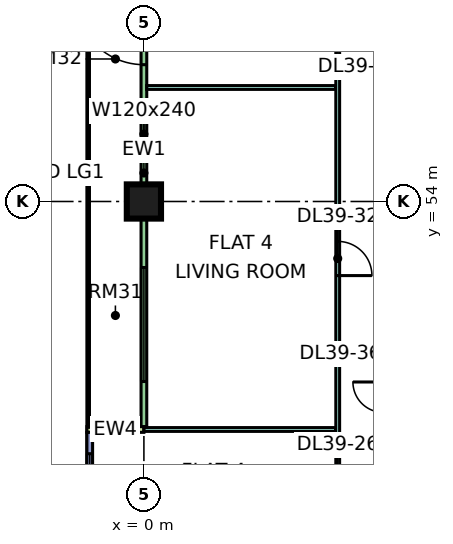
"""IFC4 building model, lengths in metres.
Left out: names, types, materials, properties, quantities, classifications, styles, units other than length and angle.
Written with IfcOpenShell. Run it as: python <this file> out.ifc"""

import sys

from ifc_helpers import new_model, si_unit, direction, frame, frame_2d, origin, origin_2d, place, context, subcontext, project, spatial, rectangle, extrude, element, fill, save


model = new_model("IFC4")
c1 = context("Model", 3, precision=1e-05, world=origin(), true_north=direction((0.0, 1.0)))
c2 = subcontext(c1, "Body", "Model", "MODEL_VIEW")
j1 = project(units=[si_unit("LENGTHUNIT", "METRE"), si_unit("PLANEANGLEUNIT", "RADIAN")], contexts=[c1])
p1 = place(None, origin())
s1 = spatial("IfcSite", under=j1, at=p1, CompositionType="ELEMENT")
p2 = place(p1, origin())
s2 = spatial("IfcBuilding", under=s1, at=p2, CompositionType="ELEMENT")
p3 = place(p2, frame((0.0, 0.0, 172.4)))
s3 = spatial("IfcBuildingStorey", under=s2, at=p3, CompositionType="ELEMENT", Elevation=172.4)
p4 = place(p3, frame((0.0, 54.0, 0.0), z_axis=(0.0, 0.0, 1.0), x_axis=(1.0, 0.0, 0.0)))
e1 = element("IfcColumn", 1, at=p4, inside=s3, PredefinedType="COLUMN", context=c2, shape_type="SweptSolid", body=[
    extrude(rectangle(XDim=0.9, YDim=0.9, at=origin_2d()), origin(), (0.0, 0.0, 1.0), 3.75),
])
p5 = place(p3, frame((0.0, 61.425, 0.0), z_axis=(0.0, 0.0, 1.0), x_axis=(0.0, -1.0, 0.0)))
e2 = element("IfcWall", 2, at=p5, inside=s3, PredefinedType="SOLIDWALL", context=c2, shape_type="SweptSolid", body=[
    extrude(rectangle(XDim=13.35, YDim=0.15, at=frame_2d((6.675, 0.0))), origin(), (0.0, 0.0, 1.0), 3.35),
])
p6 = place(p5, frame((0.262, 0.0, 0.45)))
e3 = element("IfcOpeningElement", 3, at=p6, cuts=e2, PredefinedType="OPENING", context=c2, shape_type="SweptSolid", body=[
    extrude(rectangle(XDim=0.9, YDim=2.4, at=frame_2d((0.45, 1.2))), frame((0.0, 0.085, 0.0), z_axis=(0.0, -1.0, 0.0), x_axis=(1.0, 0.0, 0.0)), (0.0, 0.0, 1.0), 0.17),
])
p7 = place(p5, frame((2.025, 0.0, 0.0)))
e4 = element("IfcOpeningElement", 4, at=p7, cuts=e2, PredefinedType="OPENING", context=c2, shape_type="SweptSolid", body=[
    extrude(rectangle(XDim=1.8, YDim=2.4, at=frame_2d((0.9, 1.2))), frame((0.0, 0.085, 0.0), z_axis=(0.0, -1.0, 0.0), x_axis=(1.0, 0.0, 0.0)), (0.0, 0.0, 1.0), 0.17),
])
p8 = place(p5, frame((5.05, 0.0, 0.45)))
e5 = element("IfcOpeningElement", 5, at=p8, cuts=e2, PredefinedType="OPENING", context=c2, shape_type="SweptSolid", body=[
    extrude(rectangle(XDim=1.2, YDim=2.4, at=frame_2d((0.6, 1.2))), frame((0.0, 0.085, 0.0), z_axis=(0.0, -1.0, 0.0), x_axis=(1.0, 0.0, 0.0)), (0.0, 0.0, 1.0), 0.17),
])
p9 = place(p5, frame((9.163, 0.0, 0.45)))
e6 = element("IfcOpeningElement", 6, at=p9, cuts=e2, PredefinedType="OPENING", context=c2, shape_type="SweptSolid", body=[
    extrude(rectangle(XDim=3.0, YDim=2.4, at=frame_2d((1.5, 1.2))), frame((0.0, 0.085, 0.0), z_axis=(0.0, -1.0, 0.0), x_axis=(1.0, 0.0, 0.0)), (0.0, 0.0, 1.0), 0.17),
])
p10 = place(p3, frame((-1.5, 48.0, 0.0), z_axis=(0.0, 0.0, 1.0), x_axis=(1.0, 0.0, 0.0)))
e7 = element("IfcWall", 7, at=p10, inside=s3, PredefinedType="SOLIDWALL", context=c2, shape_type="SweptSolid", body=[
    extrude(rectangle(XDim=1.5, YDim=0.15, at=frame_2d((0.75, 0.0))), origin(), (0.0, 0.0, 1.0), 3.35),
])
p11 = place(p3, frame((-1.425, 47.925, 0.0), z_axis=(0.0, 0.0, 1.0), x_axis=(0.0, -1.0, 0.0)))
e8 = element("IfcWall", 8, at=p11, inside=s3, PredefinedType="SOLIDWALL", context=c2, shape_type="SweptSolid", body=[
    extrude(rectangle(XDim=11.85, YDim=0.15, at=frame_2d((5.925, 0.0))), origin(), (0.0, 0.0, 1.0), 3.35),
])
p12 = place(p11, frame((0.562, 0.0, 0.45)))
e9 = element("IfcOpeningElement", 9, at=p12, cuts=e8, PredefinedType="OPENING", context=c2, shape_type="SweptSolid", body=[
    extrude(rectangle(XDim=1.8, YDim=2.4, at=frame_2d((0.9, 1.2))), frame((0.0, 0.085, 0.0), z_axis=(0.0, -1.0, 0.0), x_axis=(1.0, 0.0, 0.0)), (0.0, 0.0, 1.0), 0.17),
])
p13 = place(p11, frame((3.525, 0.0, 0.45)))
e10 = element("IfcOpeningElement", 10, at=p13, cuts=e8, PredefinedType="OPENING", context=c2, shape_type="SweptSolid", body=[
    extrude(rectangle(XDim=1.8, YDim=2.4, at=frame_2d((0.9, 1.2))), frame((0.0, 0.085, 0.0), z_axis=(0.0, -1.0, 0.0), x_axis=(1.0, 0.0, 0.0)), (0.0, 0.0, 1.0), 0.17),
])
p14 = place(p11, frame((6.525, 0.0, 0.45)))
e11 = element("IfcOpeningElement", 11, at=p14, cuts=e8, PredefinedType="OPENING", context=c2, shape_type="SweptSolid", body=[
    extrude(rectangle(XDim=1.8, YDim=2.4, at=frame_2d((0.9, 1.2))), frame((0.0, 0.085, 0.0), z_axis=(0.0, -1.0, 0.0), x_axis=(1.0, 0.0, 0.0)), (0.0, 0.0, 1.0), 0.17),
])
p15 = place(p11, frame((9.488, 0.0, 0.45)))
e12 = element("IfcOpeningElement", 12, at=p15, cuts=e8, PredefinedType="OPENING", context=c2, shape_type="SweptSolid", body=[
    extrude(rectangle(XDim=1.8, YDim=2.4, at=frame_2d((0.9, 1.2))), frame((0.0, 0.085, 0.0), z_axis=(0.0, -1.0, 0.0), x_axis=(1.0, 0.0, 0.0)), (0.0, 0.0, 1.0), 0.17),
])
p16 = place(p3, frame((0.0, 48.0, 0.0), z_axis=(0.0, 0.0, 1.0), x_axis=(1.0, 0.0, 0.0)))
e13 = element("IfcWall", 13, at=p16, inside=s3, PredefinedType="PARTITIONING", context=c2, shape_type="SweptSolid", body=[
    extrude(rectangle(XDim=5.05, YDim=0.1, at=frame_2d((2.525, 0.0))), origin(), (0.0, 0.0, 1.0), 3.35),
])
p17 = place(p3, frame((0.074, 57.0, 0.0), z_axis=(0.0, 0.0, 1.0), x_axis=(1.0, 0.0, 0.0)))
e14 = element("IfcWall", 14, at=p17, inside=s3, PredefinedType="PARTITIONING", context=c2, shape_type="SweptSolid", body=[
    extrude(rectangle(XDim=4.976, YDim=0.1, at=frame_2d((2.488, 0.0))), origin(), (0.0, 0.0, 1.0), 3.35),
])
p18 = place(p3, frame((5.1, 36.1, 0.0), z_axis=(0.0, 0.0, 1.0), x_axis=(0.0, 1.0, 0.0)))
e15 = element("IfcWall", 15, at=p18, inside=s3, PredefinedType="PARTITIONING", context=c2, shape_type="SweptSolid", body=[
    extrude(rectangle(XDim=26.826, YDim=0.1, at=frame_2d((13.413, 0.0))), origin(), (0.0, 0.0, 1.0), 3.35),
])
p19 = place(p18, frame((0.95, 0.0, 0.0)))
e16 = element("IfcOpeningElement", 16, at=p19, cuts=e15, PredefinedType="OPENING", context=c2, shape_type="SweptSolid", body=[
    extrude(rectangle(XDim=0.9, YDim=2.1, at=frame_2d((0.45, 1.05))), frame((0.0, 0.06, 0.0), z_axis=(0.0, -1.0, 0.0), x_axis=(1.0, 0.0, 0.0)), (0.0, 0.0, 1.0), 0.12),
])
p20 = place(p18, frame((3.95, 0.0, 0.0)))
e17 = element("IfcOpeningElement", 17, at=p20, cuts=e15, PredefinedType="OPENING", context=c2, shape_type="SweptSolid", body=[
    extrude(rectangle(XDim=0.9, YDim=2.1, at=frame_2d((0.45, 1.05))), frame((0.0, 0.06, 0.0), z_axis=(0.0, -1.0, 0.0), x_axis=(1.0, 0.0, 0.0)), (0.0, 0.0, 1.0), 0.12),
])
p21 = place(p18, frame((9.95, 0.0, 0.0)))
e18 = element("IfcOpeningElement", 18, at=p21, cuts=e15, PredefinedType="OPENING", context=c2, shape_type="SweptSolid", body=[
    extrude(rectangle(XDim=0.9, YDim=2.1, at=frame_2d((0.45, 1.05))), frame((0.0, 0.06, 0.0), z_axis=(0.0, -1.0, 0.0), x_axis=(1.0, 0.0, 0.0)), (0.0, 0.0, 1.0), 0.12),
])
p22 = place(p18, frame((21.95, 0.0, 0.0)))
e19 = element("IfcOpeningElement", 19, at=p22, cuts=e15, PredefinedType="OPENING", context=c2, shape_type="SweptSolid", body=[
    extrude(rectangle(XDim=0.9, YDim=2.1, at=frame_2d((0.45, 1.05))), frame((0.0, 0.06, 0.0), z_axis=(0.0, -1.0, 0.0), x_axis=(1.0, 0.0, 0.0)), (0.0, 0.0, 1.0), 0.12),
])
p23 = place(p18, frame((24.95, 0.0, 0.0)))
e20 = element("IfcOpeningElement", 20, at=p23, cuts=e15, PredefinedType="OPENING", context=c2, shape_type="SweptSolid", body=[
    extrude(rectangle(XDim=0.9, YDim=2.1, at=frame_2d((0.45, 1.05))), frame((0.0, 0.06, 0.0), z_axis=(0.0, -1.0, 0.0), x_axis=(1.0, 0.0, 0.0)), (0.0, 0.0, 1.0), 0.12),
])
p24 = place(p18, frame((15.95, 0.0, 0.0)))
e21 = element("IfcOpeningElement", 21, at=p24, cuts=e15, PredefinedType="OPENING", context=c2, shape_type="SweptSolid", body=[
    extrude(rectangle(XDim=0.9, YDim=2.1, at=frame_2d((0.45, 1.05))), frame((0.0, 0.06, 0.0), z_axis=(0.0, -1.0, 0.0), x_axis=(1.0, 0.0, 0.0)), (0.0, 0.0, 1.0), 0.12),
])
p25 = place(p18, frame((6.95, 0.0, 0.0)))
e22 = element("IfcOpeningElement", 22, at=p25, cuts=e15, PredefinedType="OPENING", context=c2, shape_type="SweptSolid", body=[
    extrude(rectangle(XDim=0.9, YDim=2.1, at=frame_2d((0.45, 1.05))), frame((0.0, 0.06, 0.0), z_axis=(0.0, -1.0, 0.0), x_axis=(1.0, 0.0, 0.0)), (0.0, 0.0, 1.0), 0.12),
])
p26 = place(p7, frame((1.8, 0.0, 0.0), z_axis=(0.0, 0.0, 1.0), x_axis=(-1.0, 0.0, 0.0)))
e23 = element("IfcDoor", 23, at=p26, inside=s3, OperationType="DOUBLE_DOOR_SINGLE_SWING", PredefinedType="DOOR", context=c2, shape_type="SweptSolid", body=[
    extrude(rectangle(XDim=1.8, YDim=2.4, at=frame_2d((0.9, 1.2))), frame((0.0, 0.025, 0.0), z_axis=(0.0, -1.0, 0.0), x_axis=(1.0, 0.0, 0.0)), (0.0, 0.0, 1.0), 0.05),
])
fill(e4, e23)
p27 = place(p8, origin())
e24 = element("IfcWindow", 24, at=p27, inside=s3, PartitioningType="SINGLE_PANEL", PredefinedType="WINDOW", context=c2, shape_type="SweptSolid", body=[
    extrude(rectangle(XDim=1.2, YDim=2.4, at=frame_2d((0.6, 1.2))), frame((0.0, 0.03, 0.0), z_axis=(0.0, -1.0, 0.0), x_axis=(1.0, 0.0, 0.0)), (0.0, 0.0, 1.0), 0.06),
])
fill(e5, e24)
p28 = place(p9, origin())
e25 = element("IfcWindow", 25, at=p28, inside=s3, PartitioningType="SINGLE_PANEL", PredefinedType="WINDOW", context=c2, shape_type="SweptSolid", body=[
    extrude(rectangle(XDim=3.0, YDim=2.4, at=frame_2d((1.5, 1.2))), frame((0.0, 0.03, 0.0), z_axis=(0.0, -1.0, 0.0), x_axis=(1.0, 0.0, 0.0)), (0.0, 0.0, 1.0), 0.06),
])
fill(e6, e25)
p29 = place(p12, origin())
e26 = element("IfcWindow", 26, at=p29, inside=s3, PartitioningType="SINGLE_PANEL", PredefinedType="WINDOW", context=c2, shape_type="SweptSolid", body=[
    extrude(rectangle(XDim=1.8, YDim=2.4, at=frame_2d((0.9, 1.2))), frame((0.0, 0.03, 0.0), z_axis=(0.0, -1.0, 0.0), x_axis=(1.0, 0.0, 0.0)), (0.0, 0.0, 1.0), 0.06),
])
fill(e9, e26)
p30 = place(p24, frame((0.9, 0.0, 0.0), z_axis=(0.0, 0.0, 1.0), x_axis=(-1.0, 0.0, 0.0)))
e27 = element("IfcDoor", 27, at=p30, inside=s3, OperationType="SINGLE_SWING_LEFT", PredefinedType="DOOR", context=c2, shape_type="SweptSolid", body=[
    extrude(rectangle(XDim=0.9, YDim=2.1, at=frame_2d((0.45, 1.05))), frame((0.0, 0.025, 0.0), z_axis=(0.0, -1.0, 0.0), x_axis=(1.0, 0.0, 0.0)), (0.0, 0.0, 1.0), 0.05),
])
fill(e21, e27)
save(model, sys.argv[1])
